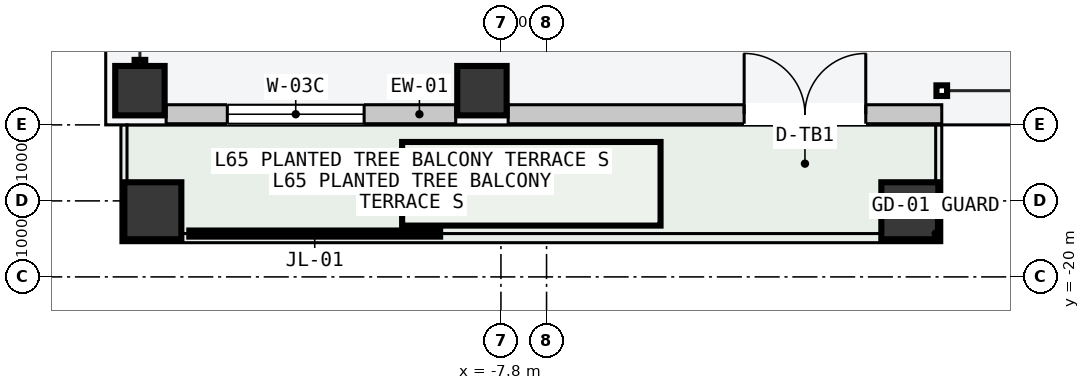
"""IFC4 building model, lengths in metres.
Left out: names, types, materials, properties, quantities, classifications, styles, units other than length and angle.
Written with IfcOpenShell. Run it as: python <this file> out.ifc"""

import sys

from ifc_helpers import new_model, si_unit, direction, frame, frame_2d, origin, origin_2d, place, context, subcontext, project, spatial, rectangle, hollow_rectangle, extrude, element, fill, save


model = new_model("IFC4")
c1 = context("Model", 3, precision=1e-05, world=origin(), true_north=direction((0.0, 1.0)))
c2 = subcontext(c1, "Body", "Model", "MODEL_VIEW")
j1 = project(units=[si_unit("LENGTHUNIT", "METRE"), si_unit("PLANEANGLEUNIT", "RADIAN")], contexts=[c1])
p1 = place(None, origin())
s1 = spatial("IfcSite", under=j1, at=p1, CompositionType="ELEMENT")
p2 = place(p1, origin())
s2 = spatial("IfcBuilding", under=s1, at=p2, CompositionType="ELEMENT")
p3 = place(p2, frame((0.0, 0.0, 247.2)))
s3 = spatial("IfcBuildingStorey", under=s2, at=p3, CompositionType="ELEMENT", Elevation=247.2)
for number, where, z_axis, x_axis in (
    (1, (-12.55, -17.55, 0.0), (0.0, 0.0, 1.0), (1.0, 0.0, 0.0)),
    (2, (-8.05, -17.55, 0.0), (0.0, 0.0, 1.0), (1.0, 0.0, 0.0)),
):
    element("IfcColumn", number, at=place(p3, frame(where, z_axis=z_axis, x_axis=x_axis)), inside=s3, PredefinedType="COLUMN", context=c2, shape_type="SweptSolid", body=[
        extrude(hollow_rectangle(XDim=0.65, YDim=0.65, WallThickness=0.028, at=origin_2d()), origin(), (0.0, 0.0, 1.0), 3.6),
    ])
for number, where, z_axis, x_axis in (
    (3, (-12.38, -19.13, -0.2), (0.0, 0.0, 1.0), (1.0, 0.0, 0.0)),
    (4, (-2.42, -19.13, -0.2), (0.0, 0.0, 1.0), (1.0, 0.0, 0.0)),
):
    element("IfcColumn", number, at=place(p3, frame(where, z_axis=z_axis, x_axis=x_axis)), inside=s3, PredefinedType="COLUMN", context=c2, shape_type="SweptSolid", body=[
        extrude(hollow_rectangle(XDim=0.75, YDim=0.75, WallThickness=0.032, at=origin_2d()), origin(), (0.0, 0.0, 1.0), 3.8),
    ])
p4 = place(p3, frame((-12.205, -17.86, 0.0), z_axis=(0.0, 0.0, 1.0), x_axis=(1.0, 0.0, 0.0)))
e5 = element("IfcWall", 5, at=p4, inside=s3, PredefinedType="STANDARD", context=c2, shape_type="SweptSolid", body=[
    extrude(rectangle(XDim=3.81, YDim=0.25, at=frame_2d((1.905, 0.0))), origin(), (0.0, 0.0, 1.0), 3.4),
])
p5 = place(p4, frame((0.805, 0.0, 0.85)))
e6 = element("IfcOpeningElement", 6, at=p5, cuts=e5, PredefinedType="OPENING", context=c2, shape_type="SweptSolid", body=[
    extrude(rectangle(XDim=1.8, YDim=2.05, at=frame_2d((0.9, 1.025))), frame((0.0, 0.135, 0.0), z_axis=(0.0, -1.0, 0.0), x_axis=(1.0, 0.0, 0.0)), (0.0, 0.0, 1.0), 0.27),
])
p6 = place(p3, frame((-7.705, -17.86, 0.0), z_axis=(0.0, 0.0, 1.0), x_axis=(1.0, 0.0, 0.0)))
e7 = element("IfcWall", 7, at=p6, inside=s3, PredefinedType="STANDARD", context=c2, shape_type="SweptSolid", body=[
    extrude(rectangle(XDim=5.705, YDim=0.25, at=frame_2d((2.853, 0.0))), origin(), (0.0, 0.0, 1.0), 3.4),
])
p7 = place(p6, frame((3.105, 0.0, 0.0)))
e8 = element("IfcOpeningElement", 8, at=p7, cuts=e7, PredefinedType="OPENING", context=c2, shape_type="SweptSolid", body=[
    extrude(rectangle(XDim=1.6, YDim=2.2, at=frame_2d((0.8, 1.1))), frame((0.0, 0.135, 0.0), z_axis=(0.0, -1.0, 0.0), x_axis=(1.0, 0.0, 0.0)), (0.0, 0.0, 1.0), 0.27),
])
p8 = place(p5, origin())
e9 = element("IfcWindow", 9, at=p8, inside=s3, PartitioningType="SINGLE_PANEL", PredefinedType="WINDOW", context=c2, shape_type="SweptSolid", body=[
    extrude(rectangle(XDim=1.8, YDim=2.05, at=frame_2d((0.9, 1.025))), frame((0.0, 0.03, 0.0), z_axis=(0.0, -1.0, 0.0), x_axis=(1.0, 0.0, 0.0)), (0.0, 0.0, 1.0), 0.06),
])
fill(e6, e9)
p9 = place(p7, origin())
e10 = element("IfcDoor", 10, at=p9, inside=s3, OperationType="DOUBLE_DOOR_SINGLE_SWING", PredefinedType="DOOR", context=c2, shape_type="SweptSolid", body=[
    extrude(rectangle(XDim=1.6, YDim=2.2, at=frame_2d((0.8, 1.1))), frame((0.0, 0.025, 0.0), z_axis=(0.0, -1.0, 0.0), x_axis=(1.0, 0.0, 0.0)), (0.0, 0.0, 1.0), 0.05),
])
fill(e8, e10)
save(model, sys.argv[1])
